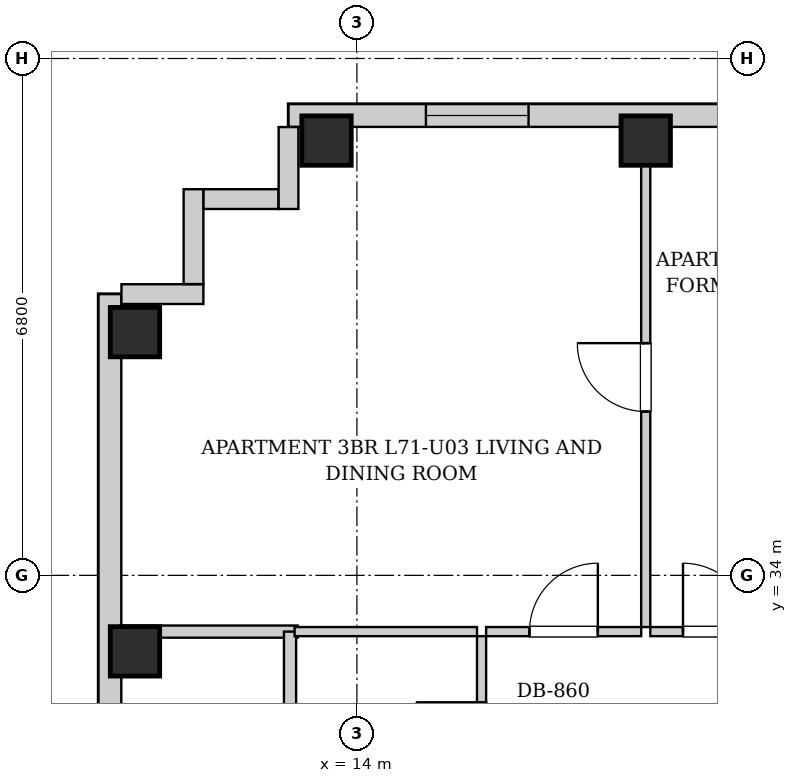
"""IFC4 building model, lengths in metres.
Left out: names, types, materials, properties, quantities, classifications, styles, units other than length and angle.
Written with IfcOpenShell. Run it as: python <this file> out.ifc"""

import sys

from ifc_helpers import new_model, si_unit, direction, frame, frame_2d, origin, origin_2d, place, context, subcontext, project, spatial, rectangle, extrude, element, fill, save


model = new_model("IFC4")
c1 = context("Model", 3, precision=1e-05, world=origin(), true_north=direction((0.0, 1.0)))
c2 = subcontext(c1, "Body", "Model", "MODEL_VIEW")
j1 = project(units=[si_unit("LENGTHUNIT", "METRE"), si_unit("PLANEANGLEUNIT", "RADIAN")], contexts=[c1])
p1 = place(None, origin())
s1 = spatial("IfcSite", under=j1, at=p1, CompositionType="ELEMENT")
p2 = place(p1, origin())
s2 = spatial("IfcBuilding", under=s1, at=p2, CompositionType="ELEMENT")
p3 = place(p2, frame((0.0, 0.0, 244.5)))
s3 = spatial("IfcBuildingStorey", under=s2, at=p3, CompositionType="ELEMENT", Elevation=244.5)
for number, where, z_axis, x_axis in (
    (1, (13.6, 39.72, 0.0), (0.0, 0.0, 1.0), (1.0, 0.0, 0.0)),
    (2, (17.8, 39.72, 0.0), (0.0, 0.0, 1.0), (1.0, 0.0, 0.0)),
    (3, (11.08, 33.0, 0.0), (0.0, 0.0, 1.0), (1.0, 0.0, 0.0)),
    (4, (11.08, 37.2, 0.0), (0.0, 0.0, 1.0), (1.0, 0.0, 0.0)),
):
    element("IfcColumn", number, at=place(p3, frame(where, z_axis=z_axis, x_axis=x_axis)), inside=s3, PredefinedType="COLUMN", context=c2, shape_type="SweptSolid", body=[
        extrude(rectangle(XDim=0.65, YDim=0.65, at=origin_2d()), origin(), (0.0, 0.0, 1.0), 3.4),
    ])
p4 = place(p3, frame((13.1, 40.05, 0.0), z_axis=(0.0, 0.0, 1.0), x_axis=(1.0, 0.0, 0.0)))
e5 = element("IfcWall", 5, at=p4, inside=s3, PredefinedType="SOLIDWALL", context=c2, shape_type="SweptSolid", body=[
    extrude(rectangle(XDim=16.4, YDim=0.3, at=frame_2d((8.2, 0.0))), origin(), (0.0, 0.0, 1.0), 3.14),
])
p5 = place(p4, frame((1.808, 0.0, 0.55)))
e6 = element("IfcOpeningElement", 6, at=p5, cuts=e5, PredefinedType="OPENING", context=c2, shape_type="SweptSolid", body=[
    extrude(rectangle(XDim=1.35, YDim=1.2, at=frame_2d((0.675, 0.6))), frame((0.0, 0.16, 0.0), z_axis=(0.0, -1.0, 0.0), x_axis=(1.0, 0.0, 0.0)), (0.0, 0.0, 1.0), 0.32),
])
p6 = place(p4, frame((6.246, 0.0, 0.55)))
e7 = element("IfcOpeningElement", 7, at=p6, cuts=e5, PredefinedType="OPENING", context=c2, shape_type="SweptSolid", body=[
    extrude(rectangle(XDim=1.35, YDim=1.2, at=frame_2d((0.675, 0.6))), frame((0.0, 0.16, 0.0), z_axis=(0.0, -1.0, 0.0), x_axis=(1.0, 0.0, 0.0)), (0.0, 0.0, 1.0), 0.32),
])
p7 = place(p4, frame((14.4, 0.0, 0.55)))
e8 = element("IfcOpeningElement", 8, at=p7, cuts=e5, PredefinedType="OPENING", context=c2, shape_type="SweptSolid", body=[
    extrude(rectangle(XDim=1.35, YDim=1.2, at=frame_2d((0.675, 0.6))), frame((0.0, 0.16, 0.0), z_axis=(0.0, -1.0, 0.0), x_axis=(1.0, 0.0, 0.0)), (0.0, 0.0, 1.0), 0.32),
])
p8 = place(p3, frame((10.75, 6.3, 0.0), z_axis=(0.0, 0.0, 1.0), x_axis=(0.0, 1.0, 0.0)))
e9 = element("IfcWall", 9, at=p8, inside=s3, PredefinedType="SOLIDWALL", context=c2, shape_type="SweptSolid", body=[
    extrude(rectangle(XDim=31.4, YDim=0.3, at=frame_2d((15.7, 0.0))), origin(), (0.0, 0.0, 1.0), 3.14),
])
p9 = place(p8, frame((1.653, 0.0, 0.55)))
e10 = element("IfcOpeningElement", 10, at=p9, cuts=e9, PredefinedType="OPENING", context=c2, shape_type="SweptSolid", body=[
    extrude(rectangle(XDim=1.35, YDim=1.2, at=frame_2d((0.675, 0.6))), frame((0.0, 0.16, 0.0), z_axis=(0.0, -1.0, 0.0), x_axis=(1.0, 0.0, 0.0)), (0.0, 0.0, 1.0), 0.32),
])
p10 = place(p8, frame((11.194, 0.0, 0.55)))
e11 = element("IfcOpeningElement", 11, at=p10, cuts=e9, PredefinedType="OPENING", context=c2, shape_type="SweptSolid", body=[
    extrude(rectangle(XDim=1.35, YDim=1.2, at=frame_2d((0.675, 0.6))), frame((0.0, 0.16, 0.0), z_axis=(0.0, -1.0, 0.0), x_axis=(1.0, 0.0, 0.0)), (0.0, 0.0, 1.0), 0.32),
])
p11 = place(p8, frame((9.185, 0.0, 0.55)))
e12 = element("IfcOpeningElement", 12, at=p11, cuts=e9, PredefinedType="OPENING", context=c2, shape_type="SweptSolid", body=[
    extrude(rectangle(XDim=1.35, YDim=1.2, at=frame_2d((0.675, 0.6))), frame((0.0, 0.16, 0.0), z_axis=(0.0, -1.0, 0.0), x_axis=(1.0, 0.0, 0.0)), (0.0, 0.0, 1.0), 0.32),
])
p12 = place(p8, frame((18.2, 0.0, 0.55)))
e13 = element("IfcOpeningElement", 13, at=p12, cuts=e9, PredefinedType="OPENING", context=c2, shape_type="SweptSolid", body=[
    extrude(rectangle(XDim=1.35, YDim=1.2, at=frame_2d((0.675, 0.6))), frame((0.0, 0.16, 0.0), z_axis=(0.0, -1.0, 0.0), x_axis=(1.0, 0.0, 0.0)), (0.0, 0.0, 1.0), 0.32),
])
p13 = place(p8, frame((19.81, 0.0, 0.55)))
e14 = element("IfcOpeningElement", 14, at=p13, cuts=e9, PredefinedType="OPENING", context=c2, shape_type="SweptSolid", body=[
    extrude(rectangle(XDim=1.35, YDim=1.2, at=frame_2d((0.675, 0.6))), frame((0.0, 0.16, 0.0), z_axis=(0.0, -1.0, 0.0), x_axis=(1.0, 0.0, 0.0)), (0.0, 0.0, 1.0), 0.32),
])
p14 = place(p3, frame((10.902, 37.7, 0.0), z_axis=(0.0, 0.0, 1.0), x_axis=(1.0, 0.0, 0.0)))
e15 = element("IfcWall", 15, at=p14, inside=s3, PredefinedType="SOLIDWALL", context=c2, shape_type="SweptSolid", body=[
    extrude(rectangle(XDim=1.078, YDim=0.26, at=frame_2d((0.539, 0.0))), origin(), (0.0, 0.0, 1.0), 3.14),
])
p15 = place(p3, frame((11.85, 37.832, 0.0), z_axis=(0.0, 0.0, 1.0), x_axis=(0.0, 1.0, 0.0)))
e16 = element("IfcWall", 16, at=p15, inside=s3, PredefinedType="SOLIDWALL", context=c2, shape_type="SweptSolid", body=[
    extrude(rectangle(XDim=1.248, YDim=0.26, at=frame_2d((0.624, 0.0))), origin(), (0.0, 0.0, 1.0), 3.14),
])
p16 = place(p3, frame((11.982, 38.95, 0.0), z_axis=(0.0, 0.0, 1.0), x_axis=(1.0, 0.0, 0.0)))
e17 = element("IfcWall", 17, at=p16, inside=s3, PredefinedType="SOLIDWALL", context=c2, shape_type="SweptSolid", body=[
    extrude(rectangle(XDim=0.986, YDim=0.26, at=frame_2d((0.493, 0.0))), origin(), (0.0, 0.0, 1.0), 3.14),
])
p17 = place(p3, frame((13.1, 38.82, 0.0), z_axis=(0.0, 0.0, 1.0), x_axis=(0.0, 1.0, 0.0)))
e18 = element("IfcWall", 18, at=p17, inside=s3, PredefinedType="SOLIDWALL", context=c2, shape_type="SweptSolid", body=[
    extrude(rectangle(XDim=1.078, YDim=0.26, at=frame_2d((0.539, 0.0))), origin(), (0.0, 0.0, 1.0), 3.14),
])
p18 = place(p3, frame((10.88, 33.26, 0.0), z_axis=(0.0, 0.0, 1.0), x_axis=(1.0, 0.0, 0.0)))
e19 = element("IfcWall", 19, at=p18, inside=s3, PredefinedType="PARTITIONING", context=c2, shape_type="SweptSolid", body=[
    extrude(rectangle(XDim=2.34, YDim=0.16, at=frame_2d((1.17, 0.0))), origin(), (0.0, 0.0, 1.0), 3.14),
])
p19 = place(p3, frame((13.12, 30.6, 0.0), z_axis=(0.0, 0.0, 1.0), x_axis=(0.0, 1.0, 0.0)))
e20 = element("IfcWall", 20, at=p19, inside=s3, PredefinedType="PARTITIONING", context=c2, shape_type="SweptSolid", body=[
    extrude(rectangle(XDim=2.66, YDim=0.16, at=frame_2d((1.33, 0.0))), origin(), (0.0, 0.0, 1.0), 3.14),
])
p20 = place(p3, frame((15.64, 30.6, 0.0), z_axis=(0.0, 0.0, 1.0), x_axis=(0.0, 1.0, 0.0)))
e21 = element("IfcWall", 21, at=p20, inside=s3, PredefinedType="PARTITIONING", context=c2, shape_type="SweptSolid", body=[
    extrude(rectangle(XDim=2.6, YDim=0.12, at=frame_2d((1.3, 0.0))), origin(), (0.0, 0.0, 1.0), 3.14),
])
p21 = place(p20, frame((0.87, 0.0, 0.0)))
e22 = element("IfcOpeningElement", 22, at=p21, cuts=e21, PredefinedType="OPENING", context=c2, shape_type="SweptSolid", body=[
    extrude(rectangle(XDim=0.86, YDim=2.05, at=frame_2d((0.43, 1.025))), frame((0.0, 0.07, 0.0), z_axis=(0.0, -1.0, 0.0), x_axis=(1.0, 0.0, 0.0)), (0.0, 0.0, 1.0), 0.14),
])
p22 = place(p3, frame((13.18, 33.26, 0.0), z_axis=(0.0, 0.0, 1.0), x_axis=(1.0, 0.0, 0.0)))
e23 = element("IfcWall", 23, at=p22, inside=s3, PredefinedType="PARTITIONING", context=c2, shape_type="SweptSolid", body=[
    extrude(rectangle(XDim=2.4, YDim=0.12, at=frame_2d((1.2, 0.0))), origin(), (0.0, 0.0, 1.0), 3.14),
])
p23 = place(p3, frame((15.7, 33.26, 0.0), z_axis=(0.0, 0.0, 1.0), x_axis=(1.0, 0.0, 0.0)))
e24 = element("IfcWall", 24, at=p23, inside=s3, PredefinedType="PARTITIONING", context=c2, shape_type="SweptSolid", body=[
    extrude(rectangle(XDim=2.04, YDim=0.12, at=frame_2d((1.02, 0.0))), origin(), (0.0, 0.0, 1.0), 3.14),
])
p24 = place(p23, frame((0.57, 0.0, 0.0)))
e25 = element("IfcOpeningElement", 25, at=p24, cuts=e24, PredefinedType="OPENING", context=c2, shape_type="SweptSolid", body=[
    extrude(rectangle(XDim=0.9, YDim=2.05, at=frame_2d((0.45, 1.025))), frame((0.0, 0.07, 0.0), z_axis=(0.0, -1.0, 0.0), x_axis=(1.0, 0.0, 0.0)), (0.0, 0.0, 1.0), 0.14),
])
p25 = place(p3, frame((17.86, 33.26, 0.0), z_axis=(0.0, 0.0, 1.0), x_axis=(1.0, 0.0, 0.0)))
e26 = element("IfcWall", 26, at=p25, inside=s3, PredefinedType="PARTITIONING", context=c2, shape_type="SweptSolid", body=[
    extrude(rectangle(XDim=1.76, YDim=0.12, at=frame_2d((0.88, 0.0))), origin(), (0.0, 0.0, 1.0), 3.14),
])
p26 = place(p25, frame((0.43, 0.0, 0.0)))
e27 = element("IfcOpeningElement", 27, at=p26, cuts=e26, PredefinedType="OPENING", context=c2, shape_type="SweptSolid", body=[
    extrude(rectangle(XDim=0.9, YDim=2.05, at=frame_2d((0.45, 1.025))), frame((0.0, 0.07, 0.0), z_axis=(0.0, -1.0, 0.0), x_axis=(1.0, 0.0, 0.0)), (0.0, 0.0, 1.0), 0.14),
])
p27 = place(p3, frame((17.8, 33.32, 0.0), z_axis=(0.0, 0.0, 1.0), x_axis=(0.0, 1.0, 0.0)))
e28 = element("IfcWall", 28, at=p27, inside=s3, PredefinedType="PARTITIONING", context=c2, shape_type="SweptSolid", body=[
    extrude(rectangle(XDim=6.6, YDim=0.12, at=frame_2d((3.3, 0.0))), origin(), (0.0, 0.0, 1.0), 2.668),
])
p28 = place(p27, frame((2.835, 0.0, 0.0)))
e29 = element("IfcOpeningElement", 29, at=p28, cuts=e28, PredefinedType="OPENING", context=c2, shape_type="SweptSolid", body=[
    extrude(rectangle(XDim=0.9, YDim=2.05, at=frame_2d((0.45, 1.025))), frame((0.0, 0.07, 0.0), z_axis=(0.0, -1.0, 0.0), x_axis=(1.0, 0.0, 0.0)), (0.0, 0.0, 1.0), 0.14),
])
p29 = place(p21, origin())
e30 = element("IfcDoor", 30, at=p29, inside=s3, OperationType="SINGLE_SWING_RIGHT", PredefinedType="DOOR", context=c2, shape_type="SweptSolid", body=[
    extrude(rectangle(XDim=0.86, YDim=2.05, at=frame_2d((0.43, 1.025))), frame((0.0, 0.025, 0.0), z_axis=(0.0, -1.0, 0.0), x_axis=(1.0, 0.0, 0.0)), (0.0, 0.0, 1.0), 0.05),
])
fill(e22, e30)
p30 = place(p24, origin())
e31 = element("IfcDoor", 31, at=p30, inside=s3, OperationType="SINGLE_SWING_RIGHT", PredefinedType="DOOR", context=c2, shape_type="SweptSolid", body=[
    extrude(rectangle(XDim=0.9, YDim=2.05, at=frame_2d((0.45, 1.025))), frame((0.0, 0.025, 0.0), z_axis=(0.0, -1.0, 0.0), x_axis=(1.0, 0.0, 0.0)), (0.0, 0.0, 1.0), 0.05),
])
fill(e25, e31)
p31 = place(p26, origin())
e32 = element("IfcDoor", 32, at=p31, inside=s3, OperationType="SINGLE_SWING_LEFT", PredefinedType="DOOR", context=c2, shape_type="SweptSolid", body=[
    extrude(rectangle(XDim=0.9, YDim=2.05, at=frame_2d((0.45, 1.025))), frame((0.0, 0.025, 0.0), z_axis=(0.0, -1.0, 0.0), x_axis=(1.0, 0.0, 0.0)), (0.0, 0.0, 1.0), 0.05),
])
fill(e27, e32)
p32 = place(p28, origin())
e33 = element("IfcDoor", 33, at=p32, inside=s3, OperationType="SINGLE_SWING_RIGHT", PredefinedType="DOOR", context=c2, shape_type="SweptSolid", body=[
    extrude(rectangle(XDim=0.9, YDim=2.05, at=frame_2d((0.45, 1.025))), frame((0.0, 0.025, 0.0), z_axis=(0.0, -1.0, 0.0), x_axis=(1.0, 0.0, 0.0)), (0.0, 0.0, 1.0), 0.05),
])
fill(e29, e33)
p33 = place(p5, origin())
e34 = element("IfcWindow", 34, at=p33, inside=s3, PartitioningType="SINGLE_PANEL", PredefinedType="WINDOW", context=c2, shape_type="SweptSolid", body=[
    extrude(rectangle(XDim=1.35, YDim=1.2, at=frame_2d((0.675, 0.6))), frame((0.0, 0.03, 0.0), z_axis=(0.0, -1.0, 0.0), x_axis=(1.0, 0.0, 0.0)), (0.0, 0.0, 1.0), 0.06),
])
fill(e6, e34)
save(model, sys.argv[1])
